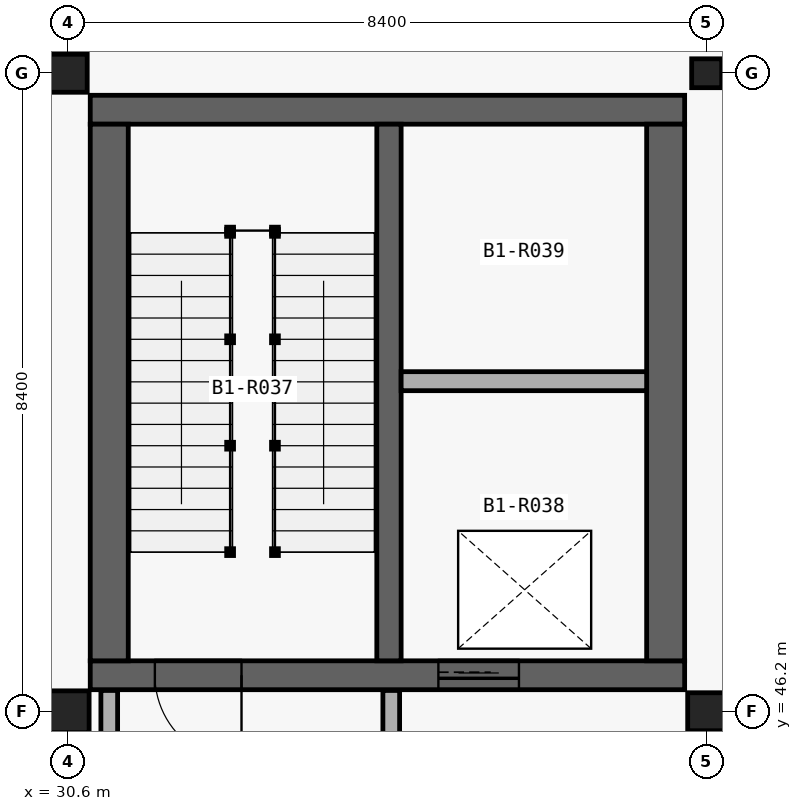
"""IFC4 building model, lengths in metres.
Left out: names, types, materials, properties, quantities, classifications, styles, units other than length and angle.
Written with IfcOpenShell. Run it as: python <this file> out.ifc"""

import sys

from ifc_helpers import new_model, si_unit, direction, frame, frame_2d, origin_with_axes, origin_2d_with_axis, place, context, subcontext, project, spatial, rectangle, i_section, extrude, element, fill, save


model = new_model("IFC4")
c1 = context("Model", 3, precision=1e-05, world=origin_with_axes(), true_north=direction((0.0, 1.0)))
c2 = subcontext(c1, "Body", "Model", "MODEL_VIEW")
j1 = project(units=[si_unit("LENGTHUNIT", "METRE"), si_unit("PLANEANGLEUNIT", "RADIAN")], contexts=[c1])
p1 = place(None, origin_with_axes())
s1 = spatial("IfcSite", under=j1, at=p1, CompositionType="ELEMENT")
p2 = place(p1, origin_with_axes())
s2 = spatial("IfcBuilding", under=s1, at=p2, CompositionType="ELEMENT")
p3 = place(p2, frame((0.0, 0.0, -4.8), z_axis=(0.0, 0.0, 1.0), x_axis=(1.0, 0.0, 0.0)))
s3 = spatial("IfcBuildingStorey", under=s2, at=p3, CompositionType="ELEMENT", Elevation=-4.8)
p4 = place(None, frame((30.89, 46.68, -5.35), z_axis=(0.0, 0.0, 1.0), x_axis=(1.0, 0.0, 0.0)))
e1 = element("IfcWall", 1, at=p4, inside=s3, PredefinedType="SHEAR", context=c2, shape_type="SweptSolid", body=[
    extrude(rectangle(XDim=7.82, YDim=0.38, at=frame_2d((3.91, 0.0), x_axis=(1.0, 0.0))), origin_with_axes(), (0.0, 0.0, 1.0), 5.35),
])
p5 = place(None, frame((32.31, 46.68, -4.8), z_axis=(0.0, 0.0, 1.0), x_axis=(1.0, 0.0, 0.0)))
e2 = element("IfcOpeningElement", 2, at=p5, cuts=e1, PredefinedType="OPENING", context=c2, shape_type="SweptSolid", body=[
    extrude(rectangle(XDim=1.14, YDim=2.18, at=frame_2d((0.0, 1.09), x_axis=(1.0, 0.0))), frame((0.0, 0.2, 0.0), z_axis=(0.0, -1.0, 0.0), x_axis=(1.0, 0.0, 0.0)), (0.0, 0.0, 1.0), 0.4),
])
p6 = place(None, frame((36.0, 46.68, -4.8), z_axis=(0.0, 0.0, 1.0), x_axis=(1.0, 0.0, 0.0)))
e3 = element("IfcOpeningElement", 3, at=p6, cuts=e1, PredefinedType="OPENING", context=c2, shape_type="SweptSolid", body=[
    extrude(rectangle(XDim=1.06, YDim=2.16, at=frame_2d((0.0, 1.08), x_axis=(1.0, 0.0))), frame((0.0, 0.2, 0.0), z_axis=(0.0, -1.0, 0.0), x_axis=(1.0, 0.0, 0.0)), (0.0, 0.0, 1.0), 0.4),
])
p7 = place(None, frame((38.71, 54.12, -5.35), z_axis=(0.0, 0.0, 1.0), x_axis=(-1.0, 0.0, 0.0)))
e4 = element("IfcWall", 4, at=p7, inside=s3, PredefinedType="SHEAR", context=c2, shape_type="SweptSolid", body=[
    extrude(rectangle(XDim=7.82, YDim=0.38, at=frame_2d((3.91, 0.0), x_axis=(1.0, 0.0))), origin_with_axes(), (0.0, 0.0, 1.0), 5.35),
])
for number, where, z_axis, x_axis in (
    (5, (38.46, 46.87, -5.35), (0.0, 0.0, 1.0), (0.0, 1.0, 0.0)),
    (6, (31.14, 53.93, -5.35), (0.0, 0.0, 1.0), (0.0, -1.0, 0.0)),
):
    element("IfcWall", number, at=place(None, frame(where, z_axis=z_axis, x_axis=x_axis)), inside=s3, PredefinedType="SHEAR", context=c2, shape_type="SweptSolid", body=[
        extrude(rectangle(XDim=7.06, YDim=0.5, at=frame_2d((3.53, 0.0), x_axis=(1.0, 0.0))), origin_with_axes(), (0.0, 0.0, 1.0), 5.35),
    ])
p8 = place(None, frame((34.82, 46.87, -5.35), z_axis=(0.0, 0.0, 1.0), x_axis=(0.0, 1.0, 0.0)))
e7 = element("IfcWall", 7, at=p8, inside=s3, PredefinedType="SHEAR", context=c2, shape_type="SweptSolid", body=[
    extrude(rectangle(XDim=7.06, YDim=0.32, at=frame_2d((3.53, 0.0), x_axis=(1.0, 0.0))), origin_with_axes(), (0.0, 0.0, 1.0), 5.35),
])
p9 = place(None, frame((34.98, 50.549, -4.8), z_axis=(0.0, 0.0, 1.0), x_axis=(1.0, 0.0, 0.0)))
e8 = element("IfcWall", 8, at=p9, inside=s3, PredefinedType="PARTITIONING", context=c2, shape_type="SweptSolid", body=[
    extrude(rectangle(XDim=3.23, YDim=0.25, at=frame_2d((1.615, 0.0), x_axis=(1.0, 0.0))), origin_with_axes(), (0.0, 0.0, 1.0), 4.44),
])
for number, where, z_axis, x_axis in (
    (9, (31.14, 45.22, -4.8), (0.0, 0.0, 1.0), (0.0, 1.0, 0.0)),
    (10, (34.85, 45.22, -4.8), (0.0, 0.0, 1.0), (0.0, 1.0, 0.0)),
):
    element("IfcWall", number, at=place(None, frame(where, z_axis=z_axis, x_axis=x_axis)), inside=s3, PredefinedType="PARTITIONING", context=c2, shape_type="SweptSolid", body=[
        extrude(rectangle(XDim=1.26, YDim=0.22, at=frame_2d((0.63, 0.0), x_axis=(1.0, 0.0))), origin_with_axes(), (0.0, 0.0, 1.0), 4.44),
    ])
p10 = place(None, frame((30.6, 46.2, -5.35), z_axis=(0.0, 0.0, 1.0), x_axis=(1.0, 0.0, 0.0)))
e11 = element("IfcColumn", 11, at=p10, inside=s3, PredefinedType="COLUMN", context=c2, shape_type="SweptSolid", body=[
    extrude(i_section(OverallWidth=0.55, OverallDepth=0.55, WebThickness=0.025, FlangeThickness=0.042, at=origin_2d_with_axis()), origin_with_axes(), (0.0, 0.0, 1.0), 5.35),
])
for number, where, z_axis, x_axis in (
    (12, (30.6, 54.6, -5.35), (0.0, 0.0, 1.0), (1.0, 0.0, 0.0)),
    (13, (39.0, 46.2, -5.35), (0.0, 0.0, 1.0), (1.0, 0.0, 0.0)),
):
    element("IfcColumn", number, at=place(None, frame(where, z_axis=z_axis, x_axis=x_axis)), inside=s3, PredefinedType="COLUMN", context=c2, shape_type="SweptSolid", body=[
        extrude(i_section(OverallWidth=0.5, OverallDepth=0.5, WebThickness=0.022, FlangeThickness=0.036, at=origin_2d_with_axis()), origin_with_axes(), (0.0, 0.0, 1.0), 5.35),
    ])
p11 = place(None, frame((39.0, 54.6, -5.35), z_axis=(0.0, 0.0, 1.0), x_axis=(1.0, 0.0, 0.0)))
e14 = element("IfcColumn", 14, at=p11, inside=s3, PredefinedType="COLUMN", context=c2, shape_type="SweptSolid", body=[
    extrude(i_section(OverallWidth=0.395, OverallDepth=0.38, WebThickness=0.019, FlangeThickness=0.03, at=origin_2d_with_axis()), origin_with_axes(), (0.0, 0.0, 1.0), 5.35),
])
p12 = place(None, frame((32.31, 46.68, -4.8), z_axis=(0.0, 0.0, 1.0), x_axis=(-1.0, 0.0, 0.0)))
e15 = element("IfcDoor", 15, at=p12, inside=s3, OperationType="SINGLE_SWING_RIGHT", PredefinedType="DOOR", context=c2, shape_type="SweptSolid", body=[
    extrude(rectangle(XDim=1.14, YDim=2.18, at=frame_2d((0.0, 1.09), x_axis=(1.0, 0.0))), frame((0.0, 0.04, 0.0), z_axis=(0.0, -1.0, 0.0), x_axis=(1.0, 0.0, 0.0)), (0.0, 0.0, 1.0), 0.08),
])
fill(e2, e15)
p13 = place(None, frame((36.0, 46.68, -4.8), z_axis=(0.0, 0.0, 1.0), x_axis=(-1.0, 0.0, 0.0)))
e16 = element("IfcDoor", 16, at=p13, inside=s3, OperationType="SLIDING_TO_LEFT", PredefinedType="DOOR", context=c2, shape_type="SweptSolid", body=[
    extrude(rectangle(XDim=1.06, YDim=2.16, at=frame_2d((0.0, 1.08), x_axis=(1.0, 0.0))), frame((0.0, 0.04, 0.0), z_axis=(0.0, -1.0, 0.0), x_axis=(1.0, 0.0, 0.0)), (0.0, 0.0, 1.0), 0.08),
])
fill(e3, e16)
save(model, sys.argv[1])
